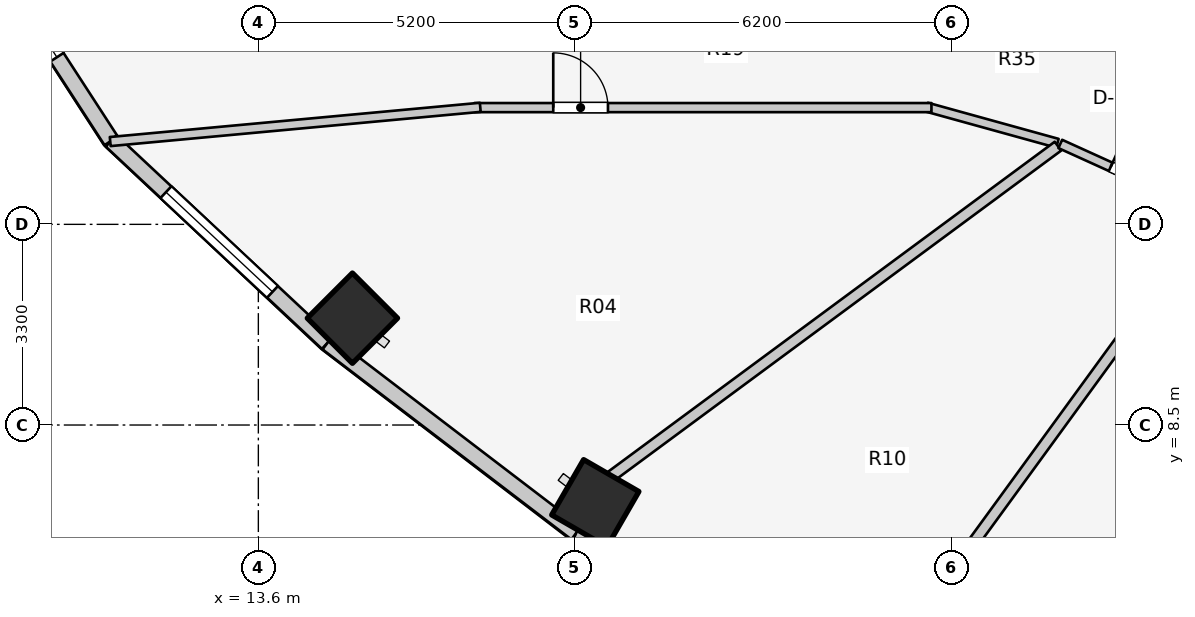
"""IFC4 building model, lengths in metres.
Left out: names, types, materials, properties, quantities, classifications, styles, units other than length and angle.
Written with IfcOpenShell. Run it as: python <this file> out.ifc"""

import sys

from ifc_helpers import new_model, si_unit, direction, frame, frame_2d, origin, origin_2d, place, context, subcontext, project, spatial, rectangle, extrude, element, fill, save


model = new_model("IFC4")
c1 = context("Model", 3, precision=1e-05, world=origin(), true_north=direction((0.0, 1.0)))
c2 = subcontext(c1, "Body", "Model", "MODEL_VIEW")
j1 = project(units=[si_unit("LENGTHUNIT", "METRE"), si_unit("PLANEANGLEUNIT", "RADIAN")], contexts=[c1])
p1 = place(None, origin())
s1 = spatial("IfcSite", under=j1, at=p1, CompositionType="ELEMENT")
p2 = place(p1, origin())
s2 = spatial("IfcBuilding", under=s1, at=p2, CompositionType="ELEMENT")
p3 = place(p2, frame((0.0, 0.0, 104.2)))
s3 = spatial("IfcBuildingStorey", under=s2, at=p3, CompositionType="ELEMENT", Elevation=104.2)
for number, where, z_axis, x_axis in (
    (1, (15.147, 10.257, 0.0), (0.0, 0.0, 1.0), (-0.707, -0.707, 0.0)),
    (2, (19.142, 7.214, 0.0), (0.0, 0.0, 1.0), (-0.5, -0.866, 0.0)),
):
    element("IfcColumn", number, at=place(p3, frame(where, z_axis=z_axis, x_axis=x_axis)), inside=s3, PredefinedType="COLUMN", context=c2, shape_type="SweptSolid", body=[
        extrude(rectangle(XDim=1.05, YDim=1.05, at=origin_2d()), origin(), (0.0, 0.0, 1.0), 3.1),
    ])
p4 = place(p3, frame((8.578, 17.181, 0.0), z_axis=(0.0, 0.0, 1.0), x_axis=(0.544388392991, -0.838833283541, 0.0)))
e3 = element("IfcWall", 3, at=p4, inside=s3, PredefinedType="STANDARD", context=c2, shape_type="SweptSolid", body=[
    extrude(rectangle(XDim=4.778, YDim=0.26, at=frame_2d((2.389, 0.0))), origin(), (0.0, 0.0, 1.0), 2.85),
])
p5 = place(p4, frame((1.639, 0.0, 0.75)))
e4 = element("IfcOpeningElement", 4, at=p5, cuts=e3, PredefinedType="OPENING", context=c2, shape_type="SweptSolid", body=[
    extrude(rectangle(XDim=1.5, YDim=1.6, at=frame_2d((0.75, 0.8))), frame((0.0, 0.14, 0.0), z_axis=(0.0, -1.0, 0.0), x_axis=(1.0, 0.0, 0.0)), (0.0, 0.0, 1.0), 0.28),
])
p6 = place(p3, frame((11.179, 13.173, 0.0), z_axis=(0.0, 0.0, 1.0), x_axis=(0.730162452258, -0.68327358599, 0.0)))
e5 = element("IfcWall", 5, at=p6, inside=s3, PredefinedType="STANDARD", context=c2, shape_type="SweptSolid", body=[
    extrude(rectangle(XDim=4.868, YDim=0.26, at=frame_2d((2.434, 0.0))), origin(), (0.0, 0.0, 1.0), 2.85),
])
p7 = place(p6, frame((1.234, 0.0, 0.75)))
e6 = element("IfcOpeningElement", 6, at=p7, cuts=e5, PredefinedType="OPENING", context=c2, shape_type="SweptSolid", body=[
    extrude(rectangle(XDim=2.4, YDim=1.7, at=frame_2d((1.2, 0.85))), frame((0.0, 0.14, 0.0), z_axis=(0.0, -1.0, 0.0), x_axis=(1.0, 0.0, 0.0)), (0.0, 0.0, 1.0), 0.28),
])
p8 = place(p3, frame((14.734, 9.847, 0.0), z_axis=(0.0, 0.0, 1.0), x_axis=(0.794809810864, -0.606858603427, 0.0)))
e7 = element("IfcWall", 7, at=p8, inside=s3, PredefinedType="STANDARD", context=c2, shape_type="SweptSolid", body=[
    extrude(rectangle(XDim=5.149, YDim=0.26, at=frame_2d((2.575, 0.0))), origin(), (0.0, 0.0, 1.0), 2.85),
])
p9 = place(p3, frame((18.827, 6.722, 0.0), z_axis=(0.0, 0.0, 1.0), x_axis=(0.914336605747, -0.404955023911, 0.0)))
e8 = element("IfcWall", 8, at=p9, inside=s3, PredefinedType="STANDARD", context=c2, shape_type="SweptSolid", body=[
    extrude(rectangle(XDim=5.859, YDim=0.26, at=frame_2d((2.929, 0.0))), origin(), (0.0, 0.0, 1.0), 2.85),
])
p10 = place(p9, frame((2.179, 0.0, 0.75)))
e9 = element("IfcOpeningElement", 9, at=p10, cuts=e8, PredefinedType="OPENING", context=c2, shape_type="SweptSolid", body=[
    extrude(rectangle(XDim=1.5, YDim=1.6, at=frame_2d((0.75, 0.8))), frame((0.0, 0.14, 0.0), z_axis=(0.0, -1.0, 0.0), x_axis=(1.0, 0.0, 0.0)), (0.0, 0.0, 1.0), 0.28),
])
p11 = place(p3, frame((26.742, 13.133, 0.0), z_axis=(0.0, 0.0, 1.0), x_axis=(-0.963833843713, 0.266503886865, 0.0)))
e10 = element("IfcWall", 10, at=p11, inside=s3, PredefinedType="PARTITIONING", context=c2, shape_type="SweptSolid", body=[
    extrude(rectangle(XDim=2.232, YDim=0.15, at=frame_2d((1.116, 0.0))), origin(), (0.0, 0.0, 1.0), 2.272),
])
p12 = place(p3, frame((17.15, 13.72, 0.0), z_axis=(0.0, 0.0, 1.0), x_axis=(1.0, 0.0, 0.0)))
e11 = element("IfcWall", 11, at=p12, inside=s3, PredefinedType="PARTITIONING", context=c2, shape_type="SweptSolid", body=[
    extrude(rectangle(XDim=7.52, YDim=0.15, at=frame_2d((3.76, 0.0))), origin(), (0.0, 0.0, 1.0), 2.272),
])
p13 = place(p12, frame((1.3, 0.0, 0.0)))
e12 = element("IfcOpeningElement", 12, at=p13, cuts=e11, PredefinedType="OPENING", context=c2, shape_type="SweptSolid", body=[
    extrude(rectangle(XDim=0.9, YDim=2.1, at=frame_2d((0.45, 1.05))), frame((0.0, 0.085, 0.0), z_axis=(0.0, -1.0, 0.0), x_axis=(1.0, 0.0, 0.0)), (0.0, 0.0, 1.0), 0.17),
])
p14 = place(p3, frame((17.25, 13.725, 0.0), z_axis=(0.0, 0.0, 1.0), x_axis=(-0.995748209098, -0.092116795851, 0.0)))
e13 = element("IfcWall", 13, at=p14, inside=s3, PredefinedType="PARTITIONING", context=c2, shape_type="SweptSolid", body=[
    extrude(rectangle(XDim=6.112, YDim=0.15, at=frame_2d((3.056, 0.0))), origin(), (0.0, 0.0, 1.0), 2.142),
])
p15 = place(p3, frame((26.751, 13.086, 0.0), z_axis=(0.0, 0.0, 1.0), x_axis=(-0.80430981394, -0.594210167533, 0.0)))
e14 = element("IfcWall", 14, at=p15, inside=s3, PredefinedType="PARTITIONING", context=c2, shape_type="SweptSolid", body=[
    extrude(rectangle(XDim=9.146, YDim=0.18, at=frame_2d((4.573, 0.0))), origin(), (0.0, 0.0, 1.0), 2.272),
])
p16 = place(p3, frame((29.273, 11.934, 0.0), z_axis=(0.0, 0.0, 1.0), x_axis=(-0.589042211476, -0.808102266486, 0.0)))
e15 = element("IfcWall", 15, at=p16, inside=s3, PredefinedType="PARTITIONING", context=c2, shape_type="SweptSolid", body=[
    extrude(rectangle(XDim=8.101, YDim=0.18, at=frame_2d((4.051, 0.0))), origin(), (0.0, 0.0, 1.0), 2.272),
])
p17 = place(p3, frame((26.789, 13.123, 0.0), z_axis=(0.0, 0.0, 1.0), x_axis=(0.910568469686, -0.41335827319, 0.0)))
e16 = element("IfcWall", 16, at=p17, inside=s3, PredefinedType="PARTITIONING", context=c2, shape_type="SweptSolid", body=[
    extrude(rectangle(XDim=2.772, YDim=0.15, at=frame_2d((1.386, 0.0))), origin(), (0.0, 0.0, 1.0), 2.272),
])
p18 = place(p17, frame((0.911, 0.0, 0.0)))
e17 = element("IfcOpeningElement", 17, at=p18, cuts=e16, PredefinedType="OPENING", context=c2, shape_type="SweptSolid", body=[
    extrude(rectangle(XDim=0.95, YDim=2.1, at=frame_2d((0.475, 1.05))), frame((0.0, 0.085, 0.0), z_axis=(0.0, -1.0, 0.0), x_axis=(1.0, 0.0, 0.0)), (0.0, 0.0, 1.0), 0.17),
])
p19 = place(p5, origin())
e18 = element("IfcWindow", 18, at=p19, inside=s3, PartitioningType="SINGLE_PANEL", PredefinedType="WINDOW", context=c2, shape_type="SweptSolid", body=[
    extrude(rectangle(XDim=1.5, YDim=1.6, at=frame_2d((0.75, 0.8))), frame((0.0, 0.03, 0.0), z_axis=(0.0, -1.0, 0.0), x_axis=(1.0, 0.0, 0.0)), (0.0, 0.0, 1.0), 0.06),
])
fill(e4, e18)
p20 = place(p7, origin())
e19 = element("IfcWindow", 19, at=p20, inside=s3, PartitioningType="SINGLE_PANEL", PredefinedType="WINDOW", context=c2, shape_type="SweptSolid", body=[
    extrude(rectangle(XDim=2.4, YDim=1.7, at=frame_2d((1.2, 0.85))), frame((0.0, 0.03, 0.0), z_axis=(0.0, -1.0, 0.0), x_axis=(1.0, 0.0, 0.0)), (0.0, 0.0, 1.0), 0.06),
])
fill(e6, e19)
p21 = place(p13, origin())
e20 = element("IfcDoor", 20, at=p21, inside=s3, OperationType="SINGLE_SWING_LEFT", PredefinedType="DOOR", context=c2, shape_type="SweptSolid", body=[
    extrude(rectangle(XDim=0.9, YDim=2.1, at=frame_2d((0.45, 1.05))), frame((0.0, 0.025, 0.0), z_axis=(0.0, -1.0, 0.0), x_axis=(1.0, 0.0, 0.0)), (0.0, 0.0, 1.0), 0.05),
])
fill(e12, e20)
p22 = place(p18, origin())
e21 = element("IfcDoor", 21, at=p22, inside=s3, OperationType="SINGLE_SWING_LEFT", PredefinedType="DOOR", context=c2, shape_type="SweptSolid", body=[
    extrude(rectangle(XDim=0.95, YDim=2.1, at=frame_2d((0.475, 1.05))), frame((0.0, 0.025, 0.0), z_axis=(0.0, -1.0, 0.0), x_axis=(1.0, 0.0, 0.0)), (0.0, 0.0, 1.0), 0.05),
])
fill(e17, e21)
save(model, sys.argv[1])
